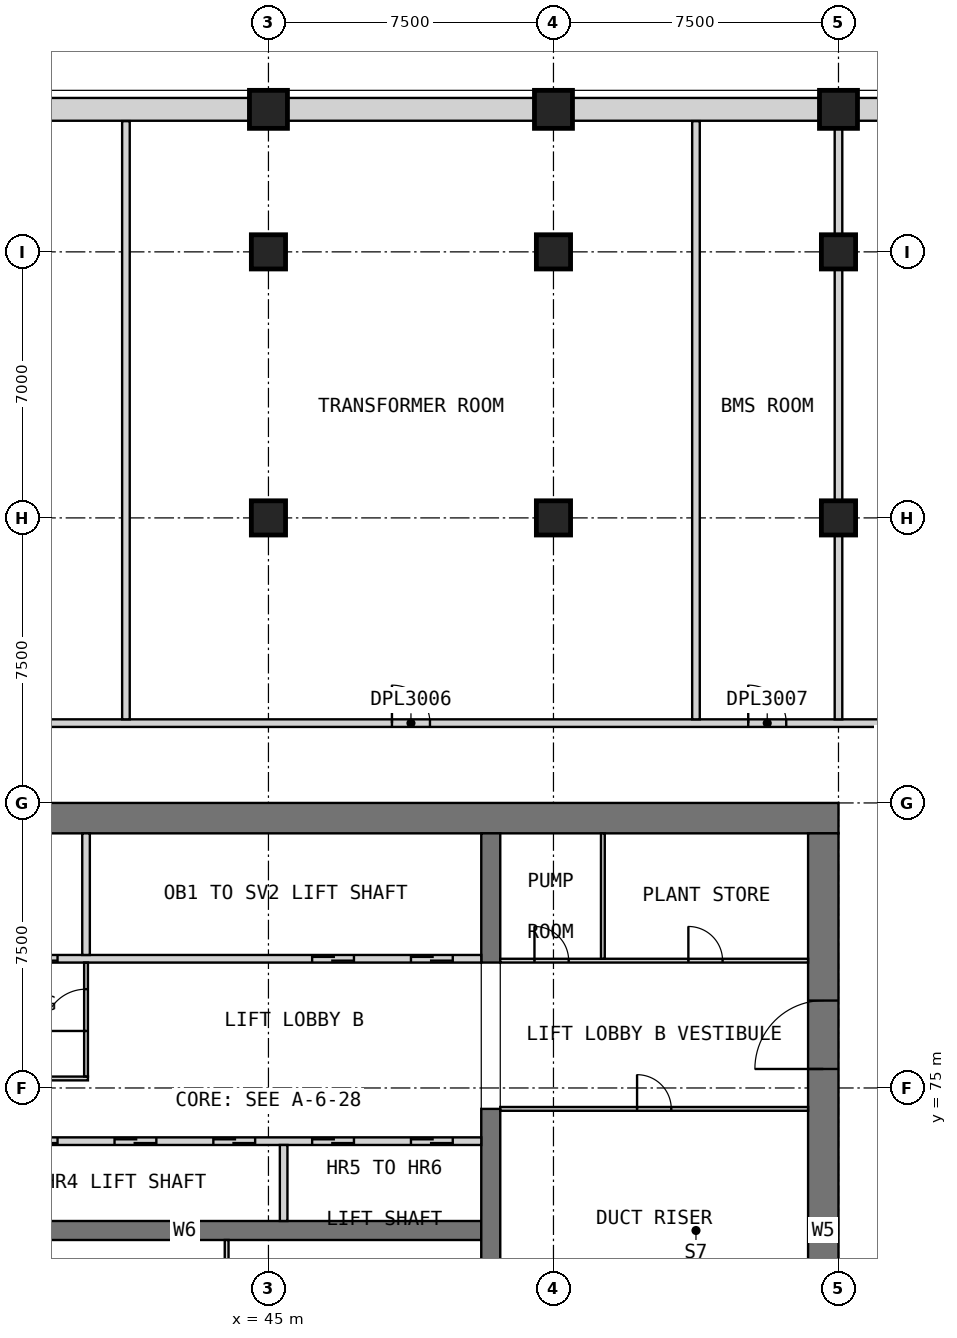
"""IFC4 building model, lengths in metres.
Left out: names, types, materials, properties, quantities, classifications, styles, units other than length and angle.
Written with IfcOpenShell. Run it as: python <this file> out.ifc"""

import sys

from ifc_helpers import new_model, si_unit, direction, frame, frame_2d, origin, origin_2d, place, context, subcontext, project, spatial, rectangle, extrude, element, fill, save


model = new_model("IFC4")
c1 = context("Model", 3, precision=1e-05, world=origin(), true_north=direction((0.0, 1.0)))
c2 = subcontext(c1, "Body", "Model", "MODEL_VIEW")
j1 = project(units=[si_unit("LENGTHUNIT", "METRE"), si_unit("PLANEANGLEUNIT", "RADIAN")], contexts=[c1])
p1 = place(None, origin())
s1 = spatial("IfcSite", under=j1, at=p1, CompositionType="ELEMENT")
p2 = place(p1, origin())
s2 = spatial("IfcBuilding", under=s1, at=p2, CompositionType="ELEMENT")
p3 = place(p2, frame((0.0, 0.0, 214.2)))
s3 = spatial("IfcBuildingStorey", under=s2, at=p3, CompositionType="ELEMENT", Elevation=214.2)
for number, where, z_axis, x_axis in (
    (1, (45.0, 100.75, 0.0), (0.0, 0.0, 1.0), (1.0, 0.0, 0.0)),
    (2, (52.5, 100.75, 0.0), (0.0, 0.0, 1.0), (1.0, 0.0, 0.0)),
    (3, (60.0, 100.75, 0.0), (0.0, 0.0, 1.0), (1.0, 0.0, 0.0)),
):
    element("IfcColumn", number, at=place(p3, frame(where, z_axis=z_axis, x_axis=x_axis)), inside=s3, PredefinedType="COLUMN", context=c2, shape_type="SweptSolid", body=[
        extrude(rectangle(XDim=1.0, YDim=1.0, at=origin_2d()), origin(), (0.0, 0.0, 1.0), 5.5),
    ])
for number, where, z_axis, x_axis in (
    (4, (45.0, 90.0, 0.0), (0.0, 0.0, 1.0), (1.0, 0.0, 0.0)),
    (5, (45.0, 97.0, 0.0), (0.0, 0.0, 1.0), (1.0, 0.0, 0.0)),
    (6, (52.5, 90.0, 0.0), (0.0, 0.0, 1.0), (1.0, 0.0, 0.0)),
    (7, (52.5, 97.0, 0.0), (0.0, 0.0, 1.0), (1.0, 0.0, 0.0)),
    (8, (60.0, 90.0, 0.0), (0.0, 0.0, 1.0), (1.0, 0.0, 0.0)),
    (9, (60.0, 97.0, 0.0), (0.0, 0.0, 1.0), (1.0, 0.0, 0.0)),
):
    element("IfcColumn", number, at=place(p3, frame(where, z_axis=z_axis, x_axis=x_axis)), inside=s3, PredefinedType="COLUMN", context=c2, shape_type="SweptSolid", body=[
        extrude(rectangle(XDim=0.9, YDim=0.9, at=origin_2d()), origin(), (0.0, 0.0, 1.0), 5.5),
    ])
p4 = place(p3, frame((30.0, 82.1, 0.0), z_axis=(0.0, 0.0, 1.0), x_axis=(1.0, 0.0, 0.0)))
e10 = element("IfcWall", 10, at=p4, inside=s3, PredefinedType="SHEAR", context=c2, shape_type="SweptSolid", body=[
    extrude(rectangle(XDim=30.0, YDim=0.8, at=frame_2d((15.0, 0.0))), origin(), (0.0, 0.0, 1.0), 5.5),
])
p5 = place(p3, frame((59.6, 60.8, 0.0), z_axis=(0.0, 0.0, 1.0), x_axis=(0.0, 1.0, 0.0)))
e11 = element("IfcWall", 11, at=p5, inside=s3, PredefinedType="SHEAR", context=c2, shape_type="SweptSolid", body=[
    extrude(rectangle(XDim=20.9, YDim=0.8, at=frame_2d((10.45, 0.0))), origin(), (0.0, 0.0, 1.0), 5.5),
])
p6 = place(p5, frame((14.7, 0.0, 0.0)))
e12 = element("IfcOpeningElement", 12, at=p6, cuts=e11, PredefinedType="OPENING", context=c2, shape_type="SweptSolid", body=[
    extrude(rectangle(XDim=1.8, YDim=2.1, at=frame_2d((0.9, 1.05))), frame((0.0, 0.41, 0.0), z_axis=(0.0, -1.0, 0.0), x_axis=(1.0, 0.0, 0.0)), (0.0, 0.0, 1.0), 0.82),
])
p7 = place(p3, frame((35.0, 71.25, 0.0), z_axis=(0.0, 0.0, 1.0), x_axis=(1.0, 0.0, 0.0)))
e13 = element("IfcWall", 13, at=p7, inside=s3, PredefinedType="SHEAR", context=c2, shape_type="SweptSolid", body=[
    extrude(rectangle(XDim=15.6, YDim=0.5, at=frame_2d((7.8, 0.0))), origin(), (0.0, 0.0, 1.0), 5.5),
])
p8 = place(p3, frame((50.85, 68.05, 0.0), z_axis=(0.0, 0.0, 1.0), x_axis=(0.0, 1.0, 0.0)))
e14 = element("IfcWall", 14, at=p8, inside=s3, PredefinedType="SHEAR", context=c2, shape_type="SweptSolid", body=[
    extrude(rectangle(XDim=6.4, YDim=0.5, at=frame_2d((3.2, 0.0))), origin(), (0.0, 0.0, 1.0), 5.5),
])
p9 = place(p3, frame((50.85, 78.3, 0.0), z_axis=(0.0, 0.0, 1.0), x_axis=(0.0, 1.0, 0.0)))
e15 = element("IfcWall", 15, at=p9, inside=s3, PredefinedType="SHEAR", context=c2, shape_type="SweptSolid", body=[
    extrude(rectangle(XDim=3.4, YDim=0.5, at=frame_2d((1.7, 0.0))), origin(), (0.0, 0.0, 1.0), 5.5),
])
for number, where, z_axis, x_axis in (
    (16, (67.0, 100.75, 0.0), (0.0, 0.0, 1.0), (-1.0, 0.0, 0.0)),
    (17, (59.5, 100.75, 0.0), (0.0, 0.0, 1.0), (-1.0, 0.0, 0.0)),
    (18, (52.0, 100.75, 0.0), (0.0, 0.0, 1.0), (-1.0, 0.0, 0.0)),
    (19, (44.5, 100.75, 0.0), (0.0, 0.0, 1.0), (-1.0, 0.0, 0.0)),
):
    element("IfcWall", number, at=place(p3, frame(where, z_axis=z_axis, x_axis=x_axis)), inside=s3, PredefinedType="ELEMENTEDWALL", context=c2, shape_type="SweptSolid", body=[
        extrude(rectangle(XDim=6.5, YDim=0.6, at=frame_2d((3.25, 0.0))), origin(), (0.0, 0.0, 1.0), 5.25),
    ])
p10 = place(p3, frame((43.9, 68.25, 0.0), z_axis=(0.0, 0.0, 1.0), x_axis=(0.0, 1.0, 0.0)))
e20 = element("IfcWall", 20, at=p10, inside=s3, PredefinedType="PARTITIONING", context=c2, shape_type="SweptSolid", body=[
    extrude(rectangle(XDim=2.75, YDim=0.1, at=frame_2d((1.375, 0.0))), origin(), (0.0, 0.0, 1.0), 5.25),
])
p11 = place(p3, frame((35.0, 73.6, 0.0), z_axis=(0.0, 0.0, 1.0), x_axis=(1.0, 0.0, 0.0)))
e21 = element("IfcWall", 21, at=p11, inside=s3, PredefinedType="SOLIDWALL", context=c2, shape_type="SweptSolid", body=[
    extrude(rectangle(XDim=15.6, YDim=0.2, at=frame_2d((7.8, 0.0))), origin(), (0.0, 0.0, 1.0), 5.5),
])
p12 = place(p11, frame((0.75, 0.0, 0.0)))
e22 = element("IfcOpeningElement", 22, at=p12, cuts=e21, PredefinedType="OPENING", context=c2, shape_type="SweptSolid", body=[
    extrude(rectangle(XDim=1.1, YDim=2.1, at=frame_2d((0.55, 1.05))), frame((0.0, 0.11, 0.0), z_axis=(0.0, -1.0, 0.0), x_axis=(1.0, 0.0, 0.0)), (0.0, 0.0, 1.0), 0.22),
])
p13 = place(p11, frame((3.35, 0.0, 0.0)))
e23 = element("IfcOpeningElement", 23, at=p13, cuts=e21, PredefinedType="OPENING", context=c2, shape_type="SweptSolid", body=[
    extrude(rectangle(XDim=1.1, YDim=2.1, at=frame_2d((0.55, 1.05))), frame((0.0, 0.11, 0.0), z_axis=(0.0, -1.0, 0.0), x_axis=(1.0, 0.0, 0.0)), (0.0, 0.0, 1.0), 0.22),
])
p14 = place(p11, frame((5.95, 0.0, 0.0)))
e24 = element("IfcOpeningElement", 24, at=p14, cuts=e21, PredefinedType="OPENING", context=c2, shape_type="SweptSolid", body=[
    extrude(rectangle(XDim=1.1, YDim=2.1, at=frame_2d((0.55, 1.05))), frame((0.0, 0.11, 0.0), z_axis=(0.0, -1.0, 0.0), x_axis=(1.0, 0.0, 0.0)), (0.0, 0.0, 1.0), 0.22),
])
p15 = place(p11, frame((8.55, 0.0, 0.0)))
e25 = element("IfcOpeningElement", 25, at=p15, cuts=e21, PredefinedType="OPENING", context=c2, shape_type="SweptSolid", body=[
    extrude(rectangle(XDim=1.1, YDim=2.1, at=frame_2d((0.55, 1.05))), frame((0.0, 0.11, 0.0), z_axis=(0.0, -1.0, 0.0), x_axis=(1.0, 0.0, 0.0)), (0.0, 0.0, 1.0), 0.22),
])
p16 = place(p11, frame((11.15, 0.0, 0.0)))
e26 = element("IfcOpeningElement", 26, at=p16, cuts=e21, PredefinedType="OPENING", context=c2, shape_type="SweptSolid", body=[
    extrude(rectangle(XDim=1.1, YDim=2.1, at=frame_2d((0.55, 1.05))), frame((0.0, 0.11, 0.0), z_axis=(0.0, -1.0, 0.0), x_axis=(1.0, 0.0, 0.0)), (0.0, 0.0, 1.0), 0.22),
])
p17 = place(p11, frame((13.75, 0.0, 0.0)))
e27 = element("IfcOpeningElement", 27, at=p17, cuts=e21, PredefinedType="OPENING", context=c2, shape_type="SweptSolid", body=[
    extrude(rectangle(XDim=1.1, YDim=2.1, at=frame_2d((0.55, 1.05))), frame((0.0, 0.11, 0.0), z_axis=(0.0, -1.0, 0.0), x_axis=(1.0, 0.0, 0.0)), (0.0, 0.0, 1.0), 0.22),
])
p18 = place(p3, frame((45.4, 71.5, 0.0), z_axis=(0.0, 0.0, 1.0), x_axis=(0.0, 1.0, 0.0)))
e28 = element("IfcWall", 28, at=p18, inside=s3, PredefinedType="SOLIDWALL", context=c2, shape_type="SweptSolid", body=[
    extrude(rectangle(XDim=2.0, YDim=0.2, at=frame_2d((1.0, 0.0))), origin(), (0.0, 0.0, 1.0), 5.5),
])
p19 = place(p3, frame((35.0, 78.4, 0.0), z_axis=(0.0, 0.0, 1.0), x_axis=(1.0, 0.0, 0.0)))
e29 = element("IfcWall", 29, at=p19, inside=s3, PredefinedType="SOLIDWALL", context=c2, shape_type="SweptSolid", body=[
    extrude(rectangle(XDim=15.6, YDim=0.2, at=frame_2d((7.8, 0.0))), origin(), (0.0, 0.0, 1.0), 5.5),
])
p20 = place(p19, frame((0.75, 0.0, 0.0)))
e30 = element("IfcOpeningElement", 30, at=p20, cuts=e29, PredefinedType="OPENING", context=c2, shape_type="SweptSolid", body=[
    extrude(rectangle(XDim=1.1, YDim=2.1, at=frame_2d((0.55, 1.05))), frame((0.0, 0.11, 0.0), z_axis=(0.0, -1.0, 0.0), x_axis=(1.0, 0.0, 0.0)), (0.0, 0.0, 1.0), 0.22),
])
p21 = place(p19, frame((3.35, 0.0, 0.0)))
e31 = element("IfcOpeningElement", 31, at=p21, cuts=e29, PredefinedType="OPENING", context=c2, shape_type="SweptSolid", body=[
    extrude(rectangle(XDim=1.1, YDim=2.1, at=frame_2d((0.55, 1.05))), frame((0.0, 0.11, 0.0), z_axis=(0.0, -1.0, 0.0), x_axis=(1.0, 0.0, 0.0)), (0.0, 0.0, 1.0), 0.22),
])
p22 = place(p19, frame((11.15, 0.0, 0.0)))
e32 = element("IfcOpeningElement", 32, at=p22, cuts=e29, PredefinedType="OPENING", context=c2, shape_type="SweptSolid", body=[
    extrude(rectangle(XDim=1.1, YDim=2.1, at=frame_2d((0.55, 1.05))), frame((0.0, 0.11, 0.0), z_axis=(0.0, -1.0, 0.0), x_axis=(1.0, 0.0, 0.0)), (0.0, 0.0, 1.0), 0.22),
])
p23 = place(p19, frame((13.75, 0.0, 0.0)))
e33 = element("IfcOpeningElement", 33, at=p23, cuts=e29, PredefinedType="OPENING", context=c2, shape_type="SweptSolid", body=[
    extrude(rectangle(XDim=1.1, YDim=2.1, at=frame_2d((0.55, 1.05))), frame((0.0, 0.11, 0.0), z_axis=(0.0, -1.0, 0.0), x_axis=(1.0, 0.0, 0.0)), (0.0, 0.0, 1.0), 0.22),
])
p24 = place(p3, frame((40.2, 78.5, 0.0), z_axis=(0.0, 0.0, 1.0), x_axis=(0.0, 1.0, 0.0)))
e34 = element("IfcWall", 34, at=p24, inside=s3, PredefinedType="SOLIDWALL", context=c2, shape_type="SweptSolid", body=[
    extrude(rectangle(XDim=3.2, YDim=0.2, at=frame_2d((1.6, 0.0))), origin(), (0.0, 0.0, 1.0), 5.5),
])
p25 = place(p3, frame((35.0, 75.25, 0.0), z_axis=(0.0, 0.0, 1.0), x_axis=(1.0, 0.0, 0.0)))
e35 = element("IfcWall", 35, at=p25, inside=s3, PredefinedType="PARTITIONING", context=c2, shape_type="SweptSolid", body=[
    extrude(rectangle(XDim=5.25, YDim=0.1, at=frame_2d((2.625, 0.0))), origin(), (0.0, 0.0, 1.0), 5.25),
])
p26 = place(p3, frame((40.2, 75.3, 0.0), z_axis=(0.0, 0.0, 1.0), x_axis=(0.0, 1.0, 0.0)))
e36 = element("IfcWall", 36, at=p26, inside=s3, PredefinedType="PARTITIONING", context=c2, shape_type="SweptSolid", body=[
    extrude(rectangle(XDim=3.0, YDim=0.1, at=frame_2d((1.5, 0.0))), origin(), (0.0, 0.0, 1.0), 5.25),
])
p27 = place(p26, frame((1.2, 0.0, 0.0)))
e37 = element("IfcOpeningElement", 37, at=p27, cuts=e36, PredefinedType="OPENING", context=c2, shape_type="SweptSolid", body=[
    extrude(rectangle(XDim=1.1, YDim=2.1, at=frame_2d((0.55, 1.05))), frame((0.0, 0.06, 0.0), z_axis=(0.0, -1.0, 0.0), x_axis=(1.0, 0.0, 0.0)), (0.0, 0.0, 1.0), 0.12),
])
p28 = place(p3, frame((51.1, 74.45, 0.0), z_axis=(0.0, 0.0, 1.0), x_axis=(1.0, 0.0, 0.0)))
e38 = element("IfcWall", 38, at=p28, inside=s3, PredefinedType="PARTITIONING", context=c2, shape_type="SweptSolid", body=[
    extrude(rectangle(XDim=8.1, YDim=0.1, at=frame_2d((4.05, 0.0))), origin(), (0.0, 0.0, 1.0), 5.25),
])
p29 = place(p28, frame((3.6, 0.0, 0.0)))
e39 = element("IfcOpeningElement", 39, at=p29, cuts=e38, PredefinedType="OPENING", context=c2, shape_type="SweptSolid", body=[
    extrude(rectangle(XDim=0.9, YDim=2.1, at=frame_2d((0.45, 1.05))), frame((0.0, 0.06, 0.0), z_axis=(0.0, -1.0, 0.0), x_axis=(1.0, 0.0, 0.0)), (0.0, 0.0, 1.0), 0.12),
])
p30 = place(p3, frame((51.1, 78.35, 0.0), z_axis=(0.0, 0.0, 1.0), x_axis=(1.0, 0.0, 0.0)))
e40 = element("IfcWall", 40, at=p30, inside=s3, PredefinedType="PARTITIONING", context=c2, shape_type="SweptSolid", body=[
    extrude(rectangle(XDim=8.1, YDim=0.1, at=frame_2d((4.05, 0.0))), origin(), (0.0, 0.0, 1.0), 5.25),
])
p31 = place(p30, frame((0.9, 0.0, 0.0)))
e41 = element("IfcOpeningElement", 41, at=p31, cuts=e40, PredefinedType="OPENING", context=c2, shape_type="SweptSolid", body=[
    extrude(rectangle(XDim=0.9, YDim=2.1, at=frame_2d((0.45, 1.05))), frame((0.0, 0.06, 0.0), z_axis=(0.0, -1.0, 0.0), x_axis=(1.0, 0.0, 0.0)), (0.0, 0.0, 1.0), 0.12),
])
p32 = place(p30, frame((4.95, 0.0, 0.0)))
e42 = element("IfcOpeningElement", 42, at=p32, cuts=e40, PredefinedType="OPENING", context=c2, shape_type="SweptSolid", body=[
    extrude(rectangle(XDim=0.9, YDim=2.1, at=frame_2d((0.45, 1.05))), frame((0.0, 0.06, 0.0), z_axis=(0.0, -1.0, 0.0), x_axis=(1.0, 0.0, 0.0)), (0.0, 0.0, 1.0), 0.12),
])
p33 = place(p3, frame((53.8, 78.4, 0.0), z_axis=(0.0, 0.0, 1.0), x_axis=(0.0, 1.0, 0.0)))
e43 = element("IfcWall", 43, at=p33, inside=s3, PredefinedType="PARTITIONING", context=c2, shape_type="SweptSolid", body=[
    extrude(rectangle(XDim=3.3, YDim=0.1, at=frame_2d((1.65, 0.0))), origin(), (0.0, 0.0, 1.0), 5.25),
])
p34 = place(p3, frame((33.75, 84.6, 0.0), z_axis=(0.0, 0.0, 1.0), x_axis=(1.0, 0.0, 0.0)))
e44 = element("IfcWall", 44, at=p34, inside=s3, PredefinedType="PARTITIONING", context=c2, shape_type="SweptSolid", body=[
    extrude(rectangle(XDim=28.35, YDim=0.2, at=frame_2d((14.175, 0.0))), origin(), (0.0, 0.0, 1.0), 5.25),
])
p35 = place(p34, frame((3.25, 0.0, 0.0)))
e45 = element("IfcOpeningElement", 45, at=p35, cuts=e44, PredefinedType="OPENING", context=c2, shape_type="SweptSolid", body=[
    extrude(rectangle(XDim=1.0, YDim=2.1, at=frame_2d((0.5, 1.05))), frame((0.0, 0.11, 0.0), z_axis=(0.0, -1.0, 0.0), x_axis=(1.0, 0.0, 0.0)), (0.0, 0.0, 1.0), 0.22),
])
p36 = place(p34, frame((14.5, 0.0, 0.0)))
e46 = element("IfcOpeningElement", 46, at=p36, cuts=e44, PredefinedType="OPENING", context=c2, shape_type="SweptSolid", body=[
    extrude(rectangle(XDim=1.0, YDim=2.1, at=frame_2d((0.5, 1.05))), frame((0.0, 0.11, 0.0), z_axis=(0.0, -1.0, 0.0), x_axis=(1.0, 0.0, 0.0)), (0.0, 0.0, 1.0), 0.22),
])
p37 = place(p34, frame((23.875, 0.0, 0.0)))
e47 = element("IfcOpeningElement", 47, at=p37, cuts=e44, PredefinedType="OPENING", context=c2, shape_type="SweptSolid", body=[
    extrude(rectangle(XDim=1.0, YDim=2.1, at=frame_2d((0.5, 1.05))), frame((0.0, 0.11, 0.0), z_axis=(0.0, -1.0, 0.0), x_axis=(1.0, 0.0, 0.0)), (0.0, 0.0, 1.0), 0.22),
])
for number, where, z_axis, x_axis in (
    (48, (41.25, 84.7, 0.0), (0.0, 0.0, 1.0), (0.0, 1.0, 0.0)),
    (49, (56.25, 84.7, 0.0), (0.0, 0.0, 1.0), (0.0, 1.0, 0.0)),
):
    element("IfcWall", number, at=place(p3, frame(where, z_axis=z_axis, x_axis=x_axis)), inside=s3, PredefinedType="PARTITIONING", context=c2, shape_type="SweptSolid", body=[
        extrude(rectangle(XDim=15.74, YDim=0.2, at=frame_2d((7.87, 0.0))), origin(), (0.0, 0.0, 1.0), 5.25),
    ])
p38 = place(p3, frame((60.0, 84.7, 0.0), z_axis=(0.0, 0.0, 1.0), x_axis=(0.0, 1.0, 0.0)))
e50 = element("IfcWall", 50, at=p38, inside=s3, PredefinedType="PARTITIONING", context=c2, shape_type="SweptSolid", body=[
    extrude(rectangle(XDim=16.55, YDim=0.2, at=frame_2d((8.275, 0.0))), origin(), (0.0, 0.0, 1.0), 5.25),
])
p39 = place(p13, origin())
e51 = element("IfcDoor", 51, at=p39, inside=s3, OperationType="DOUBLE_DOOR_SLIDING", PredefinedType="DOOR", context=c2, shape_type="SweptSolid", body=[
    extrude(rectangle(XDim=1.1, YDim=2.1, at=frame_2d((0.55, 1.05))), frame((0.0, 0.025, 0.0), z_axis=(0.0, -1.0, 0.0), x_axis=(1.0, 0.0, 0.0)), (0.0, 0.0, 1.0), 0.05),
])
fill(e23, e51)
p40 = place(p14, origin())
e52 = element("IfcDoor", 52, at=p40, inside=s3, OperationType="DOUBLE_DOOR_SLIDING", PredefinedType="DOOR", context=c2, shape_type="SweptSolid", body=[
    extrude(rectangle(XDim=1.1, YDim=2.1, at=frame_2d((0.55, 1.05))), frame((0.0, 0.025, 0.0), z_axis=(0.0, -1.0, 0.0), x_axis=(1.0, 0.0, 0.0)), (0.0, 0.0, 1.0), 0.05),
])
fill(e24, e52)
p41 = place(p15, origin())
e53 = element("IfcDoor", 53, at=p41, inside=s3, OperationType="DOUBLE_DOOR_SLIDING", PredefinedType="DOOR", context=c2, shape_type="SweptSolid", body=[
    extrude(rectangle(XDim=1.1, YDim=2.1, at=frame_2d((0.55, 1.05))), frame((0.0, 0.025, 0.0), z_axis=(0.0, -1.0, 0.0), x_axis=(1.0, 0.0, 0.0)), (0.0, 0.0, 1.0), 0.05),
])
fill(e25, e53)
p42 = place(p16, origin())
e54 = element("IfcDoor", 54, at=p42, inside=s3, OperationType="DOUBLE_DOOR_SLIDING", PredefinedType="DOOR", context=c2, shape_type="SweptSolid", body=[
    extrude(rectangle(XDim=1.1, YDim=2.1, at=frame_2d((0.55, 1.05))), frame((0.0, 0.025, 0.0), z_axis=(0.0, -1.0, 0.0), x_axis=(1.0, 0.0, 0.0)), (0.0, 0.0, 1.0), 0.05),
])
fill(e26, e54)
p43 = place(p17, origin())
e55 = element("IfcDoor", 55, at=p43, inside=s3, OperationType="DOUBLE_DOOR_SLIDING", PredefinedType="DOOR", context=c2, shape_type="SweptSolid", body=[
    extrude(rectangle(XDim=1.1, YDim=2.1, at=frame_2d((0.55, 1.05))), frame((0.0, 0.025, 0.0), z_axis=(0.0, -1.0, 0.0), x_axis=(1.0, 0.0, 0.0)), (0.0, 0.0, 1.0), 0.05),
])
fill(e27, e55)
p44 = place(p21, origin())
e56 = element("IfcDoor", 56, at=p44, inside=s3, OperationType="DOUBLE_DOOR_SLIDING", PredefinedType="DOOR", context=c2, shape_type="SweptSolid", body=[
    extrude(rectangle(XDim=1.1, YDim=2.1, at=frame_2d((0.55, 1.05))), frame((0.0, 0.025, 0.0), z_axis=(0.0, -1.0, 0.0), x_axis=(1.0, 0.0, 0.0)), (0.0, 0.0, 1.0), 0.05),
])
fill(e31, e56)
p45 = place(p22, origin())
e57 = element("IfcDoor", 57, at=p45, inside=s3, OperationType="DOUBLE_DOOR_SLIDING", PredefinedType="DOOR", context=c2, shape_type="SweptSolid", body=[
    extrude(rectangle(XDim=1.1, YDim=2.1, at=frame_2d((0.55, 1.05))), frame((0.0, 0.025, 0.0), z_axis=(0.0, -1.0, 0.0), x_axis=(1.0, 0.0, 0.0)), (0.0, 0.0, 1.0), 0.05),
])
fill(e32, e57)
p46 = place(p23, origin())
e58 = element("IfcDoor", 58, at=p46, inside=s3, OperationType="DOUBLE_DOOR_SLIDING", PredefinedType="DOOR", context=c2, shape_type="SweptSolid", body=[
    extrude(rectangle(XDim=1.1, YDim=2.1, at=frame_2d((0.55, 1.05))), frame((0.0, 0.025, 0.0), z_axis=(0.0, -1.0, 0.0), x_axis=(1.0, 0.0, 0.0)), (0.0, 0.0, 1.0), 0.05),
])
fill(e33, e58)
p47 = place(p6, origin())
e59 = element("IfcDoor", 59, at=p47, inside=s3, OperationType="DOUBLE_DOOR_SINGLE_SWING", PredefinedType="DOOR", context=c2, shape_type="SweptSolid", body=[
    extrude(rectangle(XDim=1.8, YDim=2.1, at=frame_2d((0.9, 1.05))), frame((0.0, 0.025, 0.0), z_axis=(0.0, -1.0, 0.0), x_axis=(1.0, 0.0, 0.0)), (0.0, 0.0, 1.0), 0.05),
])
fill(e12, e59)
p48 = place(p27, origin())
e60 = element("IfcDoor", 60, at=p48, inside=s3, OperationType="SINGLE_SWING_LEFT", PredefinedType="DOOR", context=c2, shape_type="SweptSolid", body=[
    extrude(rectangle(XDim=1.1, YDim=2.1, at=frame_2d((0.55, 1.05))), frame((0.0, 0.025, 0.0), z_axis=(0.0, -1.0, 0.0), x_axis=(1.0, 0.0, 0.0)), (0.0, 0.0, 1.0), 0.05),
])
fill(e37, e60)
p49 = place(p29, origin())
e61 = element("IfcDoor", 61, at=p49, inside=s3, OperationType="SINGLE_SWING_LEFT", PredefinedType="DOOR", context=c2, shape_type="SweptSolid", body=[
    extrude(rectangle(XDim=0.9, YDim=2.1, at=frame_2d((0.45, 1.05))), frame((0.0, 0.025, 0.0), z_axis=(0.0, -1.0, 0.0), x_axis=(1.0, 0.0, 0.0)), (0.0, 0.0, 1.0), 0.05),
])
fill(e39, e61)
p50 = place(p31, origin())
e62 = element("IfcDoor", 62, at=p50, inside=s3, OperationType="SINGLE_SWING_LEFT", PredefinedType="DOOR", context=c2, shape_type="SweptSolid", body=[
    extrude(rectangle(XDim=0.9, YDim=2.1, at=frame_2d((0.45, 1.05))), frame((0.0, 0.025, 0.0), z_axis=(0.0, -1.0, 0.0), x_axis=(1.0, 0.0, 0.0)), (0.0, 0.0, 1.0), 0.05),
])
fill(e41, e62)
p51 = place(p32, origin())
e63 = element("IfcDoor", 63, at=p51, inside=s3, OperationType="SINGLE_SWING_RIGHT", PredefinedType="DOOR", context=c2, shape_type="SweptSolid", body=[
    extrude(rectangle(XDim=0.9, YDim=2.1, at=frame_2d((0.45, 1.05))), frame((0.0, 0.025, 0.0), z_axis=(0.0, -1.0, 0.0), x_axis=(1.0, 0.0, 0.0)), (0.0, 0.0, 1.0), 0.05),
])
fill(e42, e63)
p52 = place(p36, origin())
e64 = element("IfcDoor", 64, at=p52, inside=s3, OperationType="SINGLE_SWING_LEFT", PredefinedType="DOOR", context=c2, shape_type="SweptSolid", body=[
    extrude(rectangle(XDim=1.0, YDim=2.1, at=frame_2d((0.5, 1.05))), frame((0.0, 0.025, 0.0), z_axis=(0.0, -1.0, 0.0), x_axis=(1.0, 0.0, 0.0)), (0.0, 0.0, 1.0), 0.05),
])
fill(e46, e64)
p53 = place(p37, origin())
e65 = element("IfcDoor", 65, at=p53, inside=s3, OperationType="SINGLE_SWING_LEFT", PredefinedType="DOOR", context=c2, shape_type="SweptSolid", body=[
    extrude(rectangle(XDim=1.0, YDim=2.1, at=frame_2d((0.5, 1.05))), frame((0.0, 0.025, 0.0), z_axis=(0.0, -1.0, 0.0), x_axis=(1.0, 0.0, 0.0)), (0.0, 0.0, 1.0), 0.05),
])
fill(e47, e65)
save(model, sys.argv[1])
